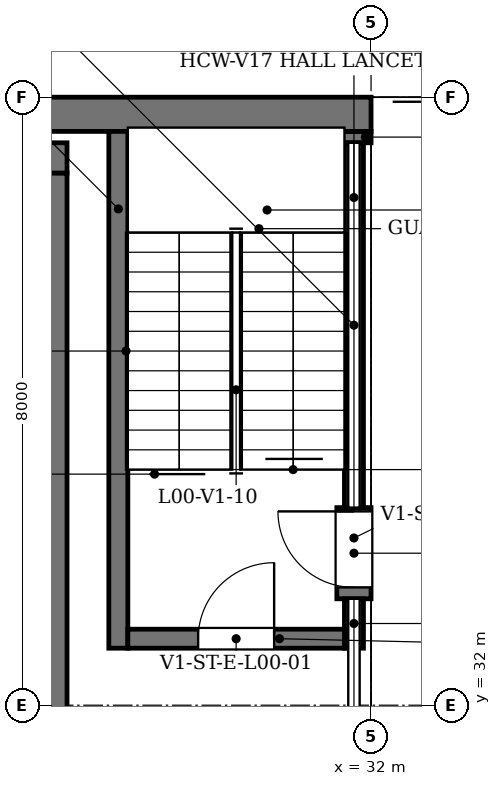
"""IFC4 building model, lengths in metres.
Left out: names, types, materials, properties, quantities, classifications, styles, units other than length and angle.
Written with IfcOpenShell. Run it as: python <this file> out.ifc"""

import sys

from ifc_helpers import new_model, si_unit, direction, frame, frame_2d, origin, place, context, subcontext, project, spatial, rectangle, extrude, element, fill, save


model = new_model("IFC4")
c1 = context("Model", 3, precision=1e-05, world=origin(), true_north=direction((0.0, 1.0)))
c2 = subcontext(c1, "Body", "Model", "MODEL_VIEW")
j1 = project(units=[si_unit("LENGTHUNIT", "METRE"), si_unit("PLANEANGLEUNIT", "RADIAN")], contexts=[c1])
p1 = place(None, origin())
s1 = spatial("IfcSite", under=j1, at=p1, CompositionType="ELEMENT")
p2 = place(p1, origin())
s2 = spatial("IfcBuilding", under=s1, at=p2, CompositionType="ELEMENT")
p3 = place(p2, origin())
s3 = spatial("IfcBuildingStorey", under=s2, at=p3, CompositionType="ELEMENT", Elevation=0.0)
p4 = place(p3, frame((4.0, 39.2, 0.0), z_axis=(0.0, 0.0, 1.0), x_axis=(1.0, 0.0, 0.0)))
e1 = element("IfcWall", 1, at=p4, inside=s3, PredefinedType="SHEAR", context=c2, shape_type="SweptSolid", body=[
    extrude(rectangle(XDim=24.0, YDim=0.4, at=frame_2d((12.0, 0.0))), origin(), (0.0, 0.0, 1.0), 4.55),
])
p5 = place(p3, frame((27.8, 16.4, 0.0), z_axis=(0.0, 0.0, 1.0), x_axis=(0.0, 1.0, 0.0)))
e2 = element("IfcWall", 2, at=p5, inside=s3, PredefinedType="SHEAR", context=c2, shape_type="SweptSolid", body=[
    extrude(rectangle(XDim=22.6, YDim=0.4, at=frame_2d((11.3, 0.0))), origin(), (0.0, 0.0, 1.0), 4.55),
])
p6 = place(p5, frame((7.313, 0.0, 0.0)))
e3 = element("IfcOpeningElement", 3, at=p6, cuts=e2, PredefinedType="OPENING", context=c2, shape_type="SweptSolid", body=[
    extrude(rectangle(XDim=2.0, YDim=2.1, at=frame_2d((1.0, 1.05))), frame((0.0, 0.21, 0.0), z_axis=(0.0, -1.0, 0.0), x_axis=(1.0, 0.0, 0.0)), (0.0, 0.0, 1.0), 0.42),
])
p7 = place(p3, frame((31.775, 33.4, 0.0), z_axis=(0.0, 0.0, 1.0), x_axis=(0.0, 1.0, 0.0)))
e4 = element("IfcWall", 4, at=p7, inside=s3, PredefinedType="SOLIDWALL", context=c2, shape_type="SweptSolid", body=[
    extrude(rectangle(XDim=1.2, YDim=0.45, at=frame_2d((0.6, 0.0))), origin(), (0.0, 0.0, 1.0), 4.8),
])
p8 = place(p7, frame((0.15, 0.0, 0.0)))
e5 = element("IfcOpeningElement", 5, at=p8, cuts=e4, PredefinedType="OPENING", context=c2, shape_type="SweptSolid", body=[
    extrude(rectangle(XDim=1.0, YDim=2.1, at=frame_2d((0.5, 1.05))), frame((0.0, 0.235, 0.0), z_axis=(0.0, -1.0, 0.0), x_axis=(1.0, 0.0, 0.0)), (0.0, 0.0, 1.0), 0.47),
])
p9 = place(p3, frame((31.775, 39.4, 0.0), z_axis=(0.0, 0.0, 1.0), x_axis=(0.0, 1.0, 0.0)))
e6 = element("IfcWall", 6, at=p9, inside=s3, PredefinedType="SOLIDWALL", context=c2, shape_type="SweptSolid", body=[
    extrude(rectangle(XDim=0.15, YDim=0.45, at=frame_2d((0.075, 0.0))), origin(), (0.0, 0.0, 1.0), 4.8),
])
p10 = place(p3, frame((0.0, 39.775, 0.0), z_axis=(0.0, 0.0, 1.0), x_axis=(1.0, 0.0, 0.0)))
e7 = element("IfcWall", 7, at=p10, inside=s3, PredefinedType="SOLIDWALL", context=c2, shape_type="SweptSolid", body=[
    extrude(rectangle(XDim=32.0, YDim=0.45, at=frame_2d((16.0, 0.0))), origin(), (0.0, 0.0, 1.0), 4.8),
])
p11 = place(p3, frame((28.675, 32.75, 0.0), z_axis=(0.0, 0.0, 1.0), x_axis=(0.0, 1.0, 0.0)))
e8 = element("IfcWall", 8, at=p11, inside=s3, PredefinedType="SOLIDWALL", context=c2, shape_type="SweptSolid", body=[
    extrude(rectangle(XDim=6.8, YDim=0.25, at=frame_2d((3.4, 0.0))), origin(), (0.0, 0.0, 1.0), 4.8),
])
p12 = place(p3, frame((31.775, 32.75, 0.0), z_axis=(0.0, 0.0, 1.0), x_axis=(0.0, 1.0, 0.0)))
e9 = element("IfcWall", 9, at=p12, inside=s3, PredefinedType="SOLIDWALL", context=c2, shape_type="SweptSolid", body=[
    extrude(rectangle(XDim=0.65, YDim=0.25, at=frame_2d((0.325, 0.0))), origin(), (0.0, 0.0, 1.0), 4.53),
])
p13 = place(p3, frame((31.775, 34.6, 0.0), z_axis=(0.0, 0.0, 1.0), x_axis=(0.0, 1.0, 0.0)))
e10 = element("IfcWall", 10, at=p13, inside=s3, PredefinedType="SOLIDWALL", context=c2, shape_type="SweptSolid", body=[
    extrude(rectangle(XDim=4.8, YDim=0.25, at=frame_2d((2.4, 0.0))), origin(), (0.0, 0.0, 1.0), 4.53),
])
p14 = place(p3, frame((28.8, 32.875, 0.0), z_axis=(0.0, 0.0, 1.0), x_axis=(1.0, 0.0, 0.0)))
e11 = element("IfcWall", 11, at=p14, inside=s3, PredefinedType="SOLIDWALL", context=c2, shape_type="SweptSolid", body=[
    extrude(rectangle(XDim=2.85, YDim=0.25, at=frame_2d((1.425, 0.0))), origin(), (0.0, 0.0, 1.0), 4.8),
])
p15 = place(p14, frame((0.925, 0.0, 0.0)))
e12 = element("IfcOpeningElement", 12, at=p15, cuts=e11, PredefinedType="OPENING", context=c2, shape_type="SweptSolid", body=[
    extrude(rectangle(XDim=1.0, YDim=2.1, at=frame_2d((0.5, 1.05))), frame((0.0, 0.135, 0.0), z_axis=(0.0, -1.0, 0.0), x_axis=(1.0, 0.0, 0.0)), (0.0, 0.0, 1.0), 0.27),
])
p16 = place(p15, frame((1.0, 0.0, 0.0), z_axis=(0.0, 0.0, 1.0), x_axis=(-1.0, 0.0, 0.0)))
e13 = element("IfcDoor", 13, at=p16, inside=s3, OperationType="SINGLE_SWING_RIGHT", PredefinedType="DOOR", context=c2, shape_type="SweptSolid", body=[
    extrude(rectangle(XDim=1.0, YDim=2.1, at=frame_2d((0.5, 1.05))), frame((0.0, 0.025, 0.0), z_axis=(0.0, -1.0, 0.0), x_axis=(1.0, 0.0, 0.0)), (0.0, 0.0, 1.0), 0.05),
])
fill(e12, e13)
p17 = place(p8, frame((1.0, 0.0, 0.0), z_axis=(0.0, 0.0, 1.0), x_axis=(-1.0, 0.0, 0.0)))
e14 = element("IfcDoor", 14, at=p17, inside=s3, OperationType="SINGLE_SWING_RIGHT", PredefinedType="DOOR", context=c2, shape_type="SweptSolid", body=[
    extrude(rectangle(XDim=1.0, YDim=2.1, at=frame_2d((0.5, 1.05))), frame((0.0, 0.025, 0.0), z_axis=(0.0, -1.0, 0.0), x_axis=(1.0, 0.0, 0.0)), (0.0, 0.0, 1.0), 0.05),
])
fill(e5, e14)
save(model, sys.argv[1])
